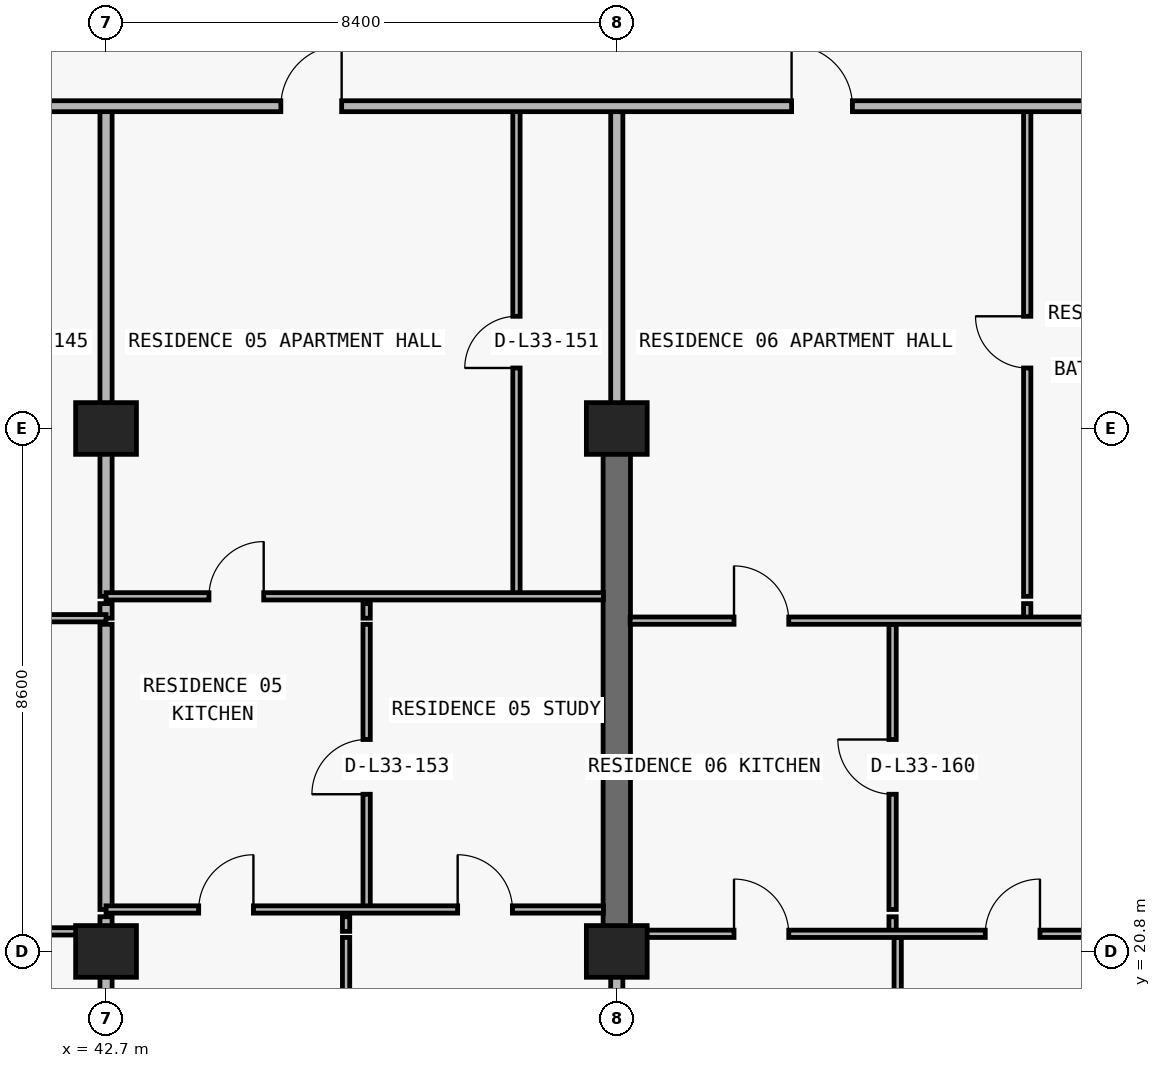
"""IFC4 building model, lengths in metres.
Left out: names, types, materials, properties, quantities, classifications, styles, units other than length and angle.
Written with IfcOpenShell. Run it as: python <this file> out.ifc"""

import sys

from ifc_helpers import new_model, si_unit, direction, frame, frame_2d, origin, origin_2d, place, context, subcontext, project, spatial, rectangle, extrude, element, fill, save


model = new_model("IFC4")
c1 = context("Model", 3, precision=1e-05, world=origin(), true_north=direction((0.0, 1.0)))
c2 = subcontext(c1, "Body", "Model", "MODEL_VIEW")
j1 = project(units=[si_unit("LENGTHUNIT", "METRE"), si_unit("PLANEANGLEUNIT", "RADIAN")], contexts=[c1])
p1 = place(None, origin())
s1 = spatial("IfcSite", under=j1, at=p1, CompositionType="ELEMENT")
p2 = place(p1, origin())
s2 = spatial("IfcBuilding", under=s1, at=p2, CompositionType="ELEMENT")
p3 = place(p2, frame((0.0, 0.0, 122.4)))
s3 = spatial("IfcBuildingStorey", under=s2, at=p3, CompositionType="ELEMENT", Elevation=122.4)
for number, where, z_axis, x_axis in (
    (1, (42.7, 20.8, 0.0), (0.0, 0.0, 1.0), (1.0, 0.0, 0.0)),
    (2, (51.1, 20.8, 0.0), (0.0, 0.0, 1.0), (1.0, 0.0, 0.0)),
    (3, (42.7, 29.4, 0.0), (0.0, 0.0, 1.0), (1.0, 0.0, 0.0)),
    (4, (51.1, 29.4, 0.0), (0.0, 0.0, 1.0), (1.0, 0.0, 0.0)),
):
    element("IfcColumn", number, at=place(p3, frame(where, z_axis=z_axis, x_axis=x_axis)), inside=s3, PredefinedType="COLUMN", context=c2, shape_type="SweptSolid", body=[
        extrude(rectangle(XDim=1.0, YDim=0.85, at=origin_2d()), origin(), (0.0, 0.0, 1.0), 3.05),
    ])
p4 = place(p3, frame((51.1, 20.8, 0.0), z_axis=(0.0, 0.0, 1.0), x_axis=(0.0, 1.0, 0.0)))
e5 = element("IfcWall", 5, at=p4, inside=s3, PredefinedType="SHEAR", context=c2, shape_type="SweptSolid", body=[
    extrude(rectangle(XDim=8.6, YDim=0.45, at=frame_2d((4.3, 0.0))), origin(), (0.0, 0.0, 1.0), 3.05),
])
p5 = place(p3, frame((42.7, 8.84, 0.0), z_axis=(0.0, 0.0, 1.0), x_axis=(0.0, 1.0, 0.0)))
e6 = element("IfcWall", 6, at=p5, inside=s3, PredefinedType="PARTITIONING", context=c2, shape_type="SweptSolid", body=[
    extrude(rectangle(XDim=12.19, YDim=0.2, at=frame_2d((6.095, 0.0))), origin(), (0.0, 0.0, 1.0), 2.174),
])
p6 = place(p3, frame((42.7, 21.13, 0.0), z_axis=(0.0, 0.0, 1.0), x_axis=(0.0, 1.0, 0.0)))
e7 = element("IfcWall", 7, at=p6, inside=s3, PredefinedType="PARTITIONING", context=c2, shape_type="SweptSolid", body=[
    extrude(rectangle(XDim=0.24, YDim=0.2, at=frame_2d((0.12, 0.0))), origin(), (0.0, 0.0, 1.0), 2.174),
])
p7 = place(p3, frame((42.7, 21.49, 0.0), z_axis=(0.0, 0.0, 1.0), x_axis=(0.0, 1.0, 0.0)))
e8 = element("IfcWall", 8, at=p7, inside=s3, PredefinedType="PARTITIONING", context=c2, shape_type="SweptSolid", body=[
    extrude(rectangle(XDim=4.69, YDim=0.2, at=frame_2d((2.345, 0.0))), origin(), (0.0, 0.0, 1.0), 2.174),
])
p8 = place(p3, frame((42.7, 26.28, 0.0), z_axis=(0.0, 0.0, 1.0), x_axis=(0.0, 1.0, 0.0)))
e9 = element("IfcWall", 9, at=p8, inside=s3, PredefinedType="PARTITIONING", context=c2, shape_type="SweptSolid", body=[
    extrude(rectangle(XDim=0.24, YDim=0.2, at=frame_2d((0.12, 0.0))), origin(), (0.0, 0.0, 1.0), 2.174),
])
p9 = place(p3, frame((42.7, 26.64, 0.0), z_axis=(0.0, 0.0, 1.0), x_axis=(0.0, 1.0, 0.0)))
e10 = element("IfcWall", 10, at=p9, inside=s3, PredefinedType="PARTITIONING", context=c2, shape_type="SweptSolid", body=[
    extrude(rectangle(XDim=8.06, YDim=0.2, at=frame_2d((4.03, 0.0))), origin(), (0.0, 0.0, 1.0), 2.174),
])
p10 = place(p3, frame((46.648, 8.84, 0.0), z_axis=(0.0, 0.0, 1.0), x_axis=(0.0, 1.0, 0.0)))
e11 = element("IfcWall", 11, at=p10, inside=s3, PredefinedType="PARTITIONING", context=c2, shape_type="SweptSolid", body=[
    extrude(rectangle(XDim=12.19, YDim=0.12, at=frame_2d((6.095, 0.0))), origin(), (0.0, 0.0, 1.0), 3.05),
])
p11 = place(p3, frame((46.648, 21.13, 0.0), z_axis=(0.0, 0.0, 1.0), x_axis=(0.0, 1.0, 0.0)))
e12 = element("IfcWall", 12, at=p11, inside=s3, PredefinedType="PARTITIONING", context=c2, shape_type="SweptSolid", body=[
    extrude(rectangle(XDim=0.24, YDim=0.12, at=frame_2d((0.12, 0.0))), origin(), (0.0, 0.0, 1.0), 3.05),
])
p12 = place(p3, frame((46.986, 21.49, 0.0), z_axis=(0.0, 0.0, 1.0), x_axis=(0.0, 1.0, 0.0)))
e13 = element("IfcWall", 13, at=p12, inside=s3, PredefinedType="PARTITIONING", context=c2, shape_type="SweptSolid", body=[
    extrude(rectangle(XDim=4.69, YDim=0.12, at=frame_2d((2.345, 0.0))), origin(), (0.0, 0.0, 1.0), 2.486),
])
p13 = place(p12, frame((1.895, 0.0, 0.0)))
e14 = element("IfcOpeningElement", 14, at=p13, cuts=e13, PredefinedType="OPENING", context=c2, shape_type="SweptSolid", body=[
    extrude(rectangle(XDim=0.9, YDim=2.15, at=frame_2d((0.45, 1.075))), frame((0.0, 0.07, 0.0), z_axis=(0.0, -1.0, 0.0), x_axis=(1.0, 0.0, 0.0)), (0.0, 0.0, 1.0), 0.14),
])
p14 = place(p3, frame((46.986, 26.28, 0.0), z_axis=(0.0, 0.0, 1.0), x_axis=(0.0, 1.0, 0.0)))
e15 = element("IfcWall", 15, at=p14, inside=s3, PredefinedType="PARTITIONING", context=c2, shape_type="SweptSolid", body=[
    extrude(rectangle(XDim=0.24, YDim=0.12, at=frame_2d((0.12, 0.0))), origin(), (0.0, 0.0, 1.0), 2.486),
])
p15 = place(p3, frame((49.45, 26.64, 0.0), z_axis=(0.0, 0.0, 1.0), x_axis=(0.0, 1.0, 0.0)))
e16 = element("IfcWall", 16, at=p15, inside=s3, PredefinedType="PARTITIONING", context=c2, shape_type="SweptSolid", body=[
    extrude(rectangle(XDim=8.06, YDim=0.12, at=frame_2d((4.03, 0.0))), origin(), (0.0, 0.0, 1.0), 3.05),
])
p16 = place(p15, frame((3.755, 0.0, 0.0)))
e17 = element("IfcOpeningElement", 17, at=p16, cuts=e16, PredefinedType="OPENING", context=c2, shape_type="SweptSolid", body=[
    extrude(rectangle(XDim=0.85, YDim=2.1, at=frame_2d((0.425, 1.05))), frame((0.0, 0.07, 0.0), z_axis=(0.0, -1.0, 0.0), x_axis=(1.0, 0.0, 0.0)), (0.0, 0.0, 1.0), 0.14),
])
p17 = place(p3, frame((51.1, 8.84, 0.0), z_axis=(0.0, 0.0, 1.0), x_axis=(0.0, 1.0, 0.0)))
e18 = element("IfcWall", 18, at=p17, inside=s3, PredefinedType="PARTITIONING", context=c2, shape_type="SweptSolid", body=[
    extrude(rectangle(XDim=11.955, YDim=0.2, at=frame_2d((5.978, 0.0))), origin(), (0.0, 0.0, 1.0), 2.174),
])
p18 = place(p3, frame((51.1, 29.405, 0.0), z_axis=(0.0, 0.0, 1.0), x_axis=(0.0, 1.0, 0.0)))
e19 = element("IfcWall", 19, at=p18, inside=s3, PredefinedType="PARTITIONING", context=c2, shape_type="SweptSolid", body=[
    extrude(rectangle(XDim=5.295, YDim=0.2, at=frame_2d((2.647, 0.0))), origin(), (0.0, 0.0, 1.0), 2.335),
])
p19 = place(p3, frame((55.636, 21.13, 0.0), z_axis=(0.0, 0.0, 1.0), x_axis=(0.0, 1.0, 0.0)))
e20 = element("IfcWall", 20, at=p19, inside=s3, PredefinedType="PARTITIONING", context=c2, shape_type="SweptSolid", body=[
    extrude(rectangle(XDim=0.24, YDim=0.12, at=frame_2d((0.12, 0.0))), origin(), (0.0, 0.0, 1.0), 3.05),
])
p20 = place(p3, frame((55.636, 21.49, 0.0), z_axis=(0.0, 0.0, 1.0), x_axis=(0.0, 1.0, 0.0)))
e21 = element("IfcWall", 21, at=p20, inside=s3, PredefinedType="PARTITIONING", context=c2, shape_type="SweptSolid", body=[
    extrude(rectangle(XDim=4.69, YDim=0.12, at=frame_2d((2.345, 0.0))), origin(), (0.0, 0.0, 1.0), 3.05),
])
p21 = place(p20, frame((1.895, 0.0, 0.0)))
e22 = element("IfcOpeningElement", 22, at=p21, cuts=e21, PredefinedType="OPENING", context=c2, shape_type="SweptSolid", body=[
    extrude(rectangle(XDim=0.9, YDim=2.15, at=frame_2d((0.45, 1.075))), frame((0.0, 0.07, 0.0), z_axis=(0.0, -1.0, 0.0), x_axis=(1.0, 0.0, 0.0)), (0.0, 0.0, 1.0), 0.14),
])
p22 = place(p3, frame((55.72, 8.84, 0.0), z_axis=(0.0, 0.0, 1.0), x_axis=(0.0, 1.0, 0.0)))
e23 = element("IfcWall", 23, at=p22, inside=s3, PredefinedType="PARTITIONING", context=c2, shape_type="SweptSolid", body=[
    extrude(rectangle(XDim=12.19, YDim=0.12, at=frame_2d((6.095, 0.0))), origin(), (0.0, 0.0, 1.0), 3.05),
])
p23 = place(p3, frame((57.85, 26.28, 0.0), z_axis=(0.0, 0.0, 1.0), x_axis=(0.0, 1.0, 0.0)))
e24 = element("IfcWall", 24, at=p23, inside=s3, PredefinedType="PARTITIONING", context=c2, shape_type="SweptSolid", body=[
    extrude(rectangle(XDim=0.24, YDim=0.12, at=frame_2d((0.12, 0.0))), origin(), (0.0, 0.0, 1.0), 3.05),
])
p24 = place(p3, frame((57.85, 26.64, 0.0), z_axis=(0.0, 0.0, 1.0), x_axis=(0.0, 1.0, 0.0)))
e25 = element("IfcWall", 25, at=p24, inside=s3, PredefinedType="PARTITIONING", context=c2, shape_type="SweptSolid", body=[
    extrude(rectangle(XDim=8.06, YDim=0.12, at=frame_2d((4.03, 0.0))), origin(), (0.0, 0.0, 1.0), 3.05),
])
p25 = place(p24, frame((3.755, 0.0, 0.0)))
e26 = element("IfcOpeningElement", 26, at=p25, cuts=e25, PredefinedType="OPENING", context=c2, shape_type="SweptSolid", body=[
    extrude(rectangle(XDim=0.85, YDim=2.1, at=frame_2d((0.425, 1.05))), frame((0.0, 0.07, 0.0), z_axis=(0.0, -1.0, 0.0), x_axis=(1.0, 0.0, 0.0)), (0.0, 0.0, 1.0), 0.14),
])
p26 = place(p3, frame((51.32, 21.09, 0.0), z_axis=(0.0, 0.0, 1.0), x_axis=(1.0, 0.0, 0.0)))
e27 = element("IfcWall", 27, at=p26, inside=s3, PredefinedType="PARTITIONING", context=c2, shape_type="SweptSolid", body=[
    extrude(rectangle(XDim=8.18, YDim=0.12, at=frame_2d((4.09, 0.0))), origin(), (0.0, 0.0, 1.0), 2.174),
])
p27 = place(p26, frame((1.708, 0.0, 0.0)))
e28 = element("IfcOpeningElement", 28, at=p27, cuts=e27, PredefinedType="OPENING", context=c2, shape_type="SweptSolid", body=[
    extrude(rectangle(XDim=0.9, YDim=2.124, at=frame_2d((0.45, 1.062))), frame((0.0, 0.07, 0.0), z_axis=(0.0, -1.0, 0.0), x_axis=(1.0, 0.0, 0.0)), (0.0, 0.0, 1.0), 0.14),
])
p28 = place(p26, frame((5.84, 0.0, 0.0)))
e29 = element("IfcOpeningElement", 29, at=p28, cuts=e27, PredefinedType="OPENING", context=c2, shape_type="SweptSolid", body=[
    extrude(rectangle(XDim=0.9, YDim=2.124, at=frame_2d((0.45, 1.062))), frame((0.0, 0.07, 0.0), z_axis=(0.0, -1.0, 0.0), x_axis=(1.0, 0.0, 0.0)), (0.0, 0.0, 1.0), 0.14),
])
p29 = place(p3, frame((35.1, 21.13, 0.0), z_axis=(0.0, 0.0, 1.0), x_axis=(1.0, 0.0, 0.0)))
e30 = element("IfcWall", 30, at=p29, inside=s3, PredefinedType="PARTITIONING", context=c2, shape_type="SweptSolid", body=[
    extrude(rectangle(XDim=7.6, YDim=0.12, at=frame_2d((3.8, 0.0))), origin(), (0.0, 0.0, 1.0), 2.174),
])
p30 = place(p29, frame((1.64, 0.0, 0.0)))
e31 = element("IfcOpeningElement", 31, at=p30, cuts=e30, PredefinedType="OPENING", context=c2, shape_type="SweptSolid", body=[
    extrude(rectangle(XDim=0.9, YDim=2.124, at=frame_2d((0.45, 1.062))), frame((0.0, 0.07, 0.0), z_axis=(0.0, -1.0, 0.0), x_axis=(1.0, 0.0, 0.0)), (0.0, 0.0, 1.0), 0.14),
])
p31 = place(p29, frame((5.527, 0.0, 0.0)))
e32 = element("IfcOpeningElement", 32, at=p31, cuts=e30, PredefinedType="OPENING", context=c2, shape_type="SweptSolid", body=[
    extrude(rectangle(XDim=0.9, YDim=2.124, at=frame_2d((0.45, 1.062))), frame((0.0, 0.07, 0.0), z_axis=(0.0, -1.0, 0.0), x_axis=(1.0, 0.0, 0.0)), (0.0, 0.0, 1.0), 0.14),
])
p32 = place(p3, frame((42.7, 21.49, 0.0), z_axis=(0.0, 0.0, 1.0), x_axis=(1.0, 0.0, 0.0)))
e33 = element("IfcWall", 33, at=p32, inside=s3, PredefinedType="PARTITIONING", context=c2, shape_type="SweptSolid", body=[
    extrude(rectangle(XDim=8.18, YDim=0.12, at=frame_2d((4.09, 0.0))), origin(), (0.0, 0.0, 1.0), 3.05),
])
p33 = place(p32, frame((1.524, 0.0, 0.0)))
e34 = element("IfcOpeningElement", 34, at=p33, cuts=e33, PredefinedType="OPENING", context=c2, shape_type="SweptSolid", body=[
    extrude(rectangle(XDim=0.9, YDim=2.15, at=frame_2d((0.45, 1.075))), frame((0.0, 0.07, 0.0), z_axis=(0.0, -1.0, 0.0), x_axis=(1.0, 0.0, 0.0)), (0.0, 0.0, 1.0), 0.14),
])
p34 = place(p32, frame((5.783, 0.0, 0.0)))
e35 = element("IfcOpeningElement", 35, at=p34, cuts=e33, PredefinedType="OPENING", context=c2, shape_type="SweptSolid", body=[
    extrude(rectangle(XDim=0.9, YDim=2.15, at=frame_2d((0.45, 1.075))), frame((0.0, 0.07, 0.0), z_axis=(0.0, -1.0, 0.0), x_axis=(1.0, 0.0, 0.0)), (0.0, 0.0, 1.0), 0.14),
])
p35 = place(p3, frame((51.32, 26.24, 0.0), z_axis=(0.0, 0.0, 1.0), x_axis=(1.0, 0.0, 0.0)))
e36 = element("IfcWall", 36, at=p35, inside=s3, PredefinedType="PARTITIONING", context=c2, shape_type="SweptSolid", body=[
    extrude(rectangle(XDim=8.18, YDim=0.12, at=frame_2d((4.09, 0.0))), origin(), (0.0, 0.0, 1.0), 3.05),
])
p36 = place(p35, frame((1.708, 0.0, 0.0)))
e37 = element("IfcOpeningElement", 37, at=p36, cuts=e36, PredefinedType="OPENING", context=c2, shape_type="SweptSolid", body=[
    extrude(rectangle(XDim=0.9, YDim=2.15, at=frame_2d((0.45, 1.075))), frame((0.0, 0.07, 0.0), z_axis=(0.0, -1.0, 0.0), x_axis=(1.0, 0.0, 0.0)), (0.0, 0.0, 1.0), 0.14),
])
p37 = place(p3, frame((35.1, 26.28, 0.0), z_axis=(0.0, 0.0, 1.0), x_axis=(1.0, 0.0, 0.0)))
e38 = element("IfcWall", 38, at=p37, inside=s3, PredefinedType="PARTITIONING", context=c2, shape_type="SweptSolid", body=[
    extrude(rectangle(XDim=7.6, YDim=0.12, at=frame_2d((3.8, 0.0))), origin(), (0.0, 0.0, 1.0), 3.05),
])
p38 = place(p37, frame((1.727, 0.0, 0.0)))
e39 = element("IfcOpeningElement", 39, at=p38, cuts=e38, PredefinedType="OPENING", context=c2, shape_type="SweptSolid", body=[
    extrude(rectangle(XDim=0.9, YDim=2.15, at=frame_2d((0.45, 1.075))), frame((0.0, 0.07, 0.0), z_axis=(0.0, -1.0, 0.0), x_axis=(1.0, 0.0, 0.0)), (0.0, 0.0, 1.0), 0.14),
])
p39 = place(p3, frame((42.7, 26.64, 0.0), z_axis=(0.0, 0.0, 1.0), x_axis=(1.0, 0.0, 0.0)))
e40 = element("IfcWall", 40, at=p39, inside=s3, PredefinedType="PARTITIONING", context=c2, shape_type="SweptSolid", body=[
    extrude(rectangle(XDim=8.18, YDim=0.12, at=frame_2d((4.09, 0.0))), origin(), (0.0, 0.0, 1.0), 3.05),
])
p40 = place(p39, frame((1.693, 0.0, 0.0)))
e41 = element("IfcOpeningElement", 41, at=p40, cuts=e40, PredefinedType="OPENING", context=c2, shape_type="SweptSolid", body=[
    extrude(rectangle(XDim=0.9, YDim=2.15, at=frame_2d((0.45, 1.075))), frame((0.0, 0.07, 0.0), z_axis=(0.0, -1.0, 0.0), x_axis=(1.0, 0.0, 0.0)), (0.0, 0.0, 1.0), 0.14),
])
p41 = place(p3, frame((18.3, 34.7, 0.0), z_axis=(0.0, 0.0, 1.0), x_axis=(1.0, 0.0, 0.0)))
e42 = element("IfcWall", 42, at=p41, inside=s3, PredefinedType="PARTITIONING", context=c2, shape_type="SweptSolid", body=[
    extrude(rectangle(XDim=41.2, YDim=0.18, at=frame_2d((20.6, 0.0))), origin(), (0.0, 0.0, 1.0), 3.05),
])
p42 = place(p41, frame((2.875, 0.0, 0.0)))
e43 = element("IfcOpeningElement", 43, at=p42, cuts=e42, PredefinedType="OPENING", context=c2, shape_type="SweptSolid", body=[
    extrude(rectangle(XDim=1.0, YDim=2.2, at=frame_2d((0.5, 1.1))), frame((0.0, 0.1, 0.0), z_axis=(0.0, -1.0, 0.0), x_axis=(1.0, 0.0, 0.0)), (0.0, 0.0, 1.0), 0.2),
])
p43 = place(p41, frame((11.275, 0.0, 0.0)))
e44 = element("IfcOpeningElement", 44, at=p43, cuts=e42, PredefinedType="OPENING", context=c2, shape_type="SweptSolid", body=[
    extrude(rectangle(XDim=1.0, YDim=2.2, at=frame_2d((0.5, 1.1))), frame((0.0, 0.1, 0.0), z_axis=(0.0, -1.0, 0.0), x_axis=(1.0, 0.0, 0.0)), (0.0, 0.0, 1.0), 0.2),
])
p44 = place(p41, frame((19.275, 0.0, 0.0)))
e45 = element("IfcOpeningElement", 45, at=p44, cuts=e42, PredefinedType="OPENING", context=c2, shape_type="SweptSolid", body=[
    extrude(rectangle(XDim=1.0, YDim=2.2, at=frame_2d((0.5, 1.1))), frame((0.0, 0.1, 0.0), z_axis=(0.0, -1.0, 0.0), x_axis=(1.0, 0.0, 0.0)), (0.0, 0.0, 1.0), 0.2),
])
p45 = place(p41, frame((27.275, 0.0, 0.0)))
e46 = element("IfcOpeningElement", 46, at=p45, cuts=e42, PredefinedType="OPENING", context=c2, shape_type="SweptSolid", body=[
    extrude(rectangle(XDim=1.0, YDim=2.2, at=frame_2d((0.5, 1.1))), frame((0.0, 0.1, 0.0), z_axis=(0.0, -1.0, 0.0), x_axis=(1.0, 0.0, 0.0)), (0.0, 0.0, 1.0), 0.2),
])
p46 = place(p41, frame((35.675, 0.0, 0.0)))
e47 = element("IfcOpeningElement", 47, at=p46, cuts=e42, PredefinedType="OPENING", context=c2, shape_type="SweptSolid", body=[
    extrude(rectangle(XDim=1.0, YDim=2.2, at=frame_2d((0.5, 1.1))), frame((0.0, 0.1, 0.0), z_axis=(0.0, -1.0, 0.0), x_axis=(1.0, 0.0, 0.0)), (0.0, 0.0, 1.0), 0.2),
])
p47 = place(p45, origin())
e48 = element("IfcDoor", 48, at=p47, inside=s3, OperationType="SINGLE_SWING_RIGHT", PredefinedType="DOOR", context=c2, shape_type="SweptSolid", body=[
    extrude(rectangle(XDim=1.0, YDim=2.2, at=frame_2d((0.5, 1.1))), frame((0.0, 0.025, 0.0), z_axis=(0.0, -1.0, 0.0), x_axis=(1.0, 0.0, 0.0)), (0.0, 0.0, 1.0), 0.05),
])
fill(e46, e48)
p48 = place(p16, origin())
e49 = element("IfcDoor", 49, at=p48, inside=s3, OperationType="SINGLE_SWING_LEFT", PredefinedType="DOOR", context=c2, shape_type="SweptSolid", body=[
    extrude(rectangle(XDim=0.85, YDim=2.1, at=frame_2d((0.425, 1.05))), frame((0.0, 0.025, 0.0), z_axis=(0.0, -1.0, 0.0), x_axis=(1.0, 0.0, 0.0)), (0.0, 0.0, 1.0), 0.05),
])
fill(e17, e49)
p49 = place(p40, origin())
e50 = element("IfcDoor", 50, at=p49, inside=s3, OperationType="SINGLE_SWING_RIGHT", PredefinedType="DOOR", context=c2, shape_type="SweptSolid", body=[
    extrude(rectangle(XDim=0.9, YDim=2.15, at=frame_2d((0.45, 1.075))), frame((0.0, 0.025, 0.0), z_axis=(0.0, -1.0, 0.0), x_axis=(1.0, 0.0, 0.0)), (0.0, 0.0, 1.0), 0.05),
])
fill(e41, e50)
p50 = place(p13, origin())
e51 = element("IfcDoor", 51, at=p50, inside=s3, OperationType="SINGLE_SWING_LEFT", PredefinedType="DOOR", context=c2, shape_type="SweptSolid", body=[
    extrude(rectangle(XDim=0.9, YDim=2.15, at=frame_2d((0.45, 1.075))), frame((0.0, 0.025, 0.0), z_axis=(0.0, -1.0, 0.0), x_axis=(1.0, 0.0, 0.0)), (0.0, 0.0, 1.0), 0.05),
])
fill(e14, e51)
p51 = place(p33, origin())
e52 = element("IfcDoor", 52, at=p51, inside=s3, OperationType="SINGLE_SWING_RIGHT", PredefinedType="DOOR", context=c2, shape_type="SweptSolid", body=[
    extrude(rectangle(XDim=0.9, YDim=2.15, at=frame_2d((0.45, 1.075))), frame((0.0, 0.025, 0.0), z_axis=(0.0, -1.0, 0.0), x_axis=(1.0, 0.0, 0.0)), (0.0, 0.0, 1.0), 0.05),
])
fill(e34, e52)
p52 = place(p34, origin())
e53 = element("IfcDoor", 53, at=p52, inside=s3, OperationType="SINGLE_SWING_LEFT", PredefinedType="DOOR", context=c2, shape_type="SweptSolid", body=[
    extrude(rectangle(XDim=0.9, YDim=2.15, at=frame_2d((0.45, 1.075))), frame((0.0, 0.025, 0.0), z_axis=(0.0, -1.0, 0.0), x_axis=(1.0, 0.0, 0.0)), (0.0, 0.0, 1.0), 0.05),
])
fill(e35, e53)
p53 = place(p46, origin())
e54 = element("IfcDoor", 54, at=p53, inside=s3, OperationType="SINGLE_SWING_LEFT", PredefinedType="DOOR", context=c2, shape_type="SweptSolid", body=[
    extrude(rectangle(XDim=1.0, YDim=2.2, at=frame_2d((0.5, 1.1))), frame((0.0, 0.025, 0.0), z_axis=(0.0, -1.0, 0.0), x_axis=(1.0, 0.0, 0.0)), (0.0, 0.0, 1.0), 0.05),
])
fill(e47, e54)
p54 = place(p25, origin())
e55 = element("IfcDoor", 55, at=p54, inside=s3, OperationType="SINGLE_SWING_RIGHT", PredefinedType="DOOR", context=c2, shape_type="SweptSolid", body=[
    extrude(rectangle(XDim=0.85, YDim=2.1, at=frame_2d((0.425, 1.05))), frame((0.0, 0.025, 0.0), z_axis=(0.0, -1.0, 0.0), x_axis=(1.0, 0.0, 0.0)), (0.0, 0.0, 1.0), 0.05),
])
fill(e26, e55)
p55 = place(p36, origin())
e56 = element("IfcDoor", 56, at=p55, inside=s3, OperationType="SINGLE_SWING_LEFT", PredefinedType="DOOR", context=c2, shape_type="SweptSolid", body=[
    extrude(rectangle(XDim=0.9, YDim=2.15, at=frame_2d((0.45, 1.075))), frame((0.0, 0.025, 0.0), z_axis=(0.0, -1.0, 0.0), x_axis=(1.0, 0.0, 0.0)), (0.0, 0.0, 1.0), 0.05),
])
fill(e37, e56)
p56 = place(p21, origin())
e57 = element("IfcDoor", 57, at=p56, inside=s3, OperationType="SINGLE_SWING_RIGHT", PredefinedType="DOOR", context=c2, shape_type="SweptSolid", body=[
    extrude(rectangle(XDim=0.9, YDim=2.15, at=frame_2d((0.45, 1.075))), frame((0.0, 0.025, 0.0), z_axis=(0.0, -1.0, 0.0), x_axis=(1.0, 0.0, 0.0)), (0.0, 0.0, 1.0), 0.05),
])
fill(e22, e57)
p57 = place(p27, origin())
e58 = element("IfcDoor", 58, at=p57, inside=s3, OperationType="SINGLE_SWING_LEFT", PredefinedType="DOOR", context=c2, shape_type="SweptSolid", body=[
    extrude(rectangle(XDim=0.9, YDim=2.124, at=frame_2d((0.45, 1.062))), frame((0.0, 0.025, 0.0), z_axis=(0.0, -1.0, 0.0), x_axis=(1.0, 0.0, 0.0)), (0.0, 0.0, 1.0), 0.05),
])
fill(e28, e58)
p58 = place(p28, origin())
e59 = element("IfcDoor", 59, at=p58, inside=s3, OperationType="SINGLE_SWING_RIGHT", PredefinedType="DOOR", context=c2, shape_type="SweptSolid", body=[
    extrude(rectangle(XDim=0.9, YDim=2.124, at=frame_2d((0.45, 1.062))), frame((0.0, 0.025, 0.0), z_axis=(0.0, -1.0, 0.0), x_axis=(1.0, 0.0, 0.0)), (0.0, 0.0, 1.0), 0.05),
])
fill(e29, e59)
save(model, sys.argv[1])
